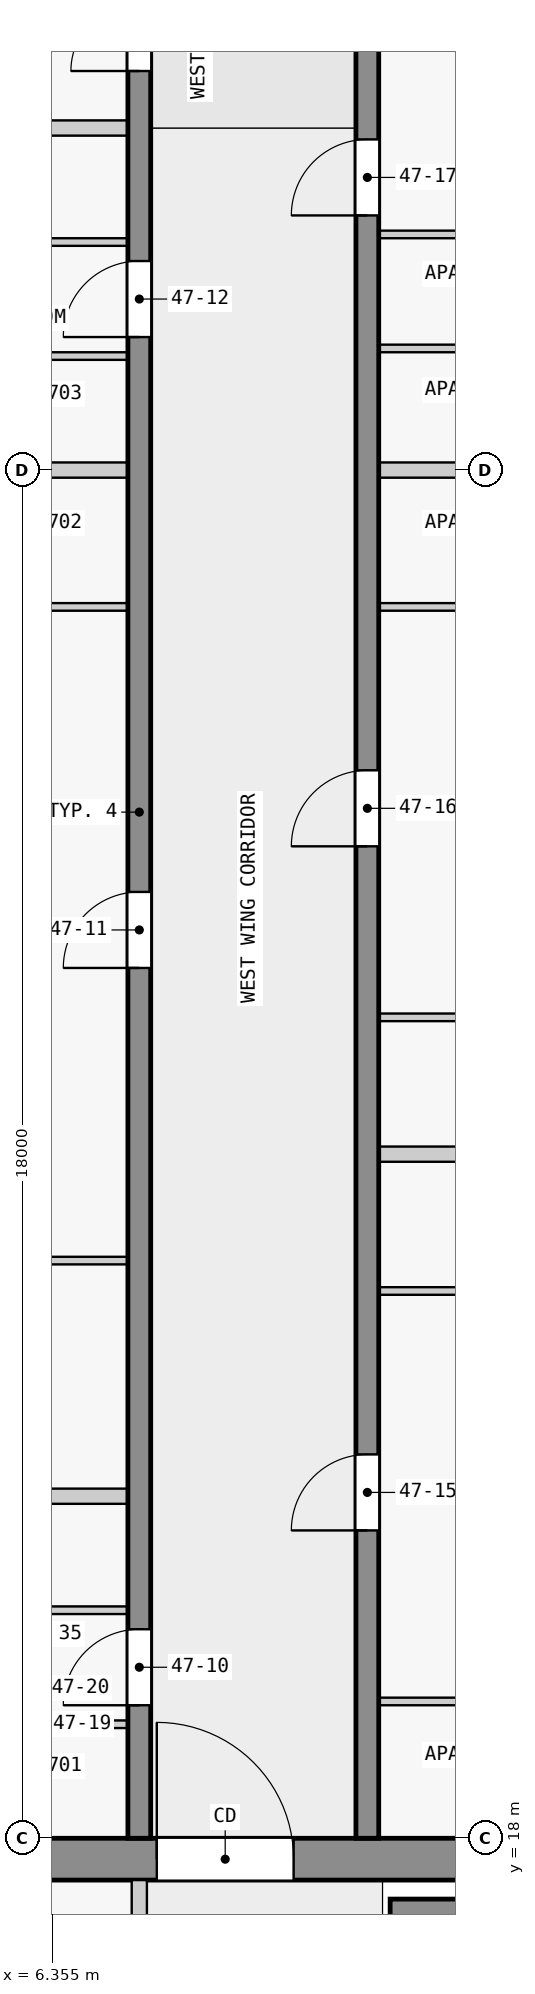
"""IFC4 building model, lengths in metres.
Left out: names, types, materials, properties, quantities, classifications, styles, units other than length and angle.
Written with IfcOpenShell. Run it as: python <this file> out.ifc"""

import sys

from ifc_helpers import new_model, si_unit, direction, frame, frame_2d, origin, place, context, subcontext, project, spatial, rectangle, extrude, element, fill, save


model = new_model("IFC4")
c1 = context("Model", 3, precision=1e-05, world=origin(), true_north=direction((0.0, 1.0)))
c2 = subcontext(c1, "Body", "Model", "MODEL_VIEW")
j1 = project(units=[si_unit("LENGTHUNIT", "METRE"), si_unit("PLANEANGLEUNIT", "RADIAN")], contexts=[c1])
p1 = place(None, origin())
s1 = spatial("IfcSite", under=j1, at=p1, CompositionType="ELEMENT")
p2 = place(p1, origin())
s2 = spatial("IfcBuilding", under=s1, at=p2, CompositionType="ELEMENT")
p3 = place(p2, frame((0.0, 0.0, 181.4)))
s3 = spatial("IfcBuildingStorey", under=s2, at=p3, CompositionType="ELEMENT", Elevation=181.4)
p4 = place(p3, frame((1.38, 17.725, 0.0), z_axis=(0.0, 0.0, 1.0), x_axis=(1.0, 0.0, 0.0)))
e1 = element("IfcWall", 1, at=p4, inside=s3, PredefinedType="SHEAR", context=c2, shape_type="SweptSolid", body=[
    extrude(rectangle(XDim=21.12, YDim=0.55, at=frame_2d((10.56, 0.0))), origin(), (0.0, 0.0, 1.0), 3.2),
])
p5 = place(p4, frame((6.35, 0.0, 0.0)))
e2 = element("IfcOpeningElement", 2, at=p5, cuts=e1, PredefinedType="OPENING", context=c2, shape_type="SweptSolid", body=[
    extrude(rectangle(XDim=1.8, YDim=2.1, at=frame_2d((0.9, 1.05))), frame((0.0, 0.285, 0.0), z_axis=(0.0, -1.0, 0.0), x_axis=(1.0, 0.0, 0.0)), (0.0, 0.0, 1.0), 0.57),
])
p6 = place(p3, frame((10.8, 17.05, 0.0), z_axis=(0.0, 0.0, 1.0), x_axis=(1.0, 0.0, 0.0)))
e3 = element("IfcWall", 3, at=p6, inside=s3, PredefinedType="SHEAR", context=c2, shape_type="SweptSolid", body=[
    extrude(rectangle(XDim=7.8, YDim=0.3, at=frame_2d((3.9, 0.0))), origin(), (0.0, 0.0, 1.0), 3.2),
])
p7 = place(p3, frame((7.5, 18.0, 0.0), z_axis=(0.0, 0.0, 1.0), x_axis=(0.0, 1.0, 0.0)))
e4 = element("IfcWall", 4, at=p7, inside=s3, PredefinedType="SHEAR", context=c2, shape_type="SweptSolid", body=[
    extrude(rectangle(XDim=27.0, YDim=0.3, at=frame_2d((13.5, 0.0))), origin(), (0.0, 0.0, 1.0), 3.2),
])
p8 = place(p7, frame((1.75, 0.0, 0.0)))
e5 = element("IfcOpeningElement", 5, at=p8, cuts=e4, PredefinedType="OPENING", context=c2, shape_type="SweptSolid", body=[
    extrude(rectangle(XDim=1.0, YDim=2.1, at=frame_2d((0.5, 1.05))), frame((0.0, 0.16, 0.0), z_axis=(0.0, -1.0, 0.0), x_axis=(1.0, 0.0, 0.0)), (0.0, 0.0, 1.0), 0.32),
])
p9 = place(p7, frame((11.45, 0.0, 0.0)))
e6 = element("IfcOpeningElement", 6, at=p9, cuts=e4, PredefinedType="OPENING", context=c2, shape_type="SweptSolid", body=[
    extrude(rectangle(XDim=1.0, YDim=2.1, at=frame_2d((0.5, 1.05))), frame((0.0, 0.16, 0.0), z_axis=(0.0, -1.0, 0.0), x_axis=(1.0, 0.0, 0.0)), (0.0, 0.0, 1.0), 0.32),
])
p10 = place(p7, frame((19.75, 0.0, 0.0)))
e7 = element("IfcOpeningElement", 7, at=p10, cuts=e4, PredefinedType="OPENING", context=c2, shape_type="SweptSolid", body=[
    extrude(rectangle(XDim=1.0, YDim=2.1, at=frame_2d((0.5, 1.05))), frame((0.0, 0.16, 0.0), z_axis=(0.0, -1.0, 0.0), x_axis=(1.0, 0.0, 0.0)), (0.0, 0.0, 1.0), 0.32),
])
p11 = place(p7, frame((23.25, 0.0, 0.0)))
e8 = element("IfcOpeningElement", 8, at=p11, cuts=e4, PredefinedType="OPENING", context=c2, shape_type="SweptSolid", body=[
    extrude(rectangle(XDim=0.9, YDim=2.1, at=frame_2d((0.45, 1.05))), frame((0.0, 0.16, 0.0), z_axis=(0.0, -1.0, 0.0), x_axis=(1.0, 0.0, 0.0)), (0.0, 0.0, 1.0), 0.32),
])
p12 = place(p7, frame((25.45, 0.0, 0.0)))
e9 = element("IfcOpeningElement", 9, at=p12, cuts=e4, PredefinedType="OPENING", context=c2, shape_type="SweptSolid", body=[
    extrude(rectangle(XDim=1.0, YDim=2.1, at=frame_2d((0.5, 1.05))), frame((0.0, 0.16, 0.0), z_axis=(0.0, -1.0, 0.0), x_axis=(1.0, 0.0, 0.0)), (0.0, 0.0, 1.0), 0.32),
])
p13 = place(p3, frame((10.5, 18.0, 0.0), z_axis=(0.0, 0.0, 1.0), x_axis=(0.0, 1.0, 0.0)))
e10 = element("IfcWall", 10, at=p13, inside=s3, PredefinedType="SHEAR", context=c2, shape_type="SweptSolid", body=[
    extrude(rectangle(XDim=27.0, YDim=0.3, at=frame_2d((13.5, 0.0))), origin(), (0.0, 0.0, 1.0), 3.2),
])
p14 = place(p13, frame((4.05, 0.0, 0.0)))
e11 = element("IfcOpeningElement", 11, at=p14, cuts=e10, PredefinedType="OPENING", context=c2, shape_type="SweptSolid", body=[
    extrude(rectangle(XDim=1.0, YDim=2.1, at=frame_2d((0.5, 1.05))), frame((0.0, 0.16, 0.0), z_axis=(0.0, -1.0, 0.0), x_axis=(1.0, 0.0, 0.0)), (0.0, 0.0, 1.0), 0.32),
])
p15 = place(p13, frame((13.05, 0.0, 0.0)))
e12 = element("IfcOpeningElement", 12, at=p15, cuts=e10, PredefinedType="OPENING", context=c2, shape_type="SweptSolid", body=[
    extrude(rectangle(XDim=1.0, YDim=2.1, at=frame_2d((0.5, 1.05))), frame((0.0, 0.16, 0.0), z_axis=(0.0, -1.0, 0.0), x_axis=(1.0, 0.0, 0.0)), (0.0, 0.0, 1.0), 0.32),
])
p16 = place(p13, frame((21.35, 0.0, 0.0)))
e13 = element("IfcOpeningElement", 13, at=p16, cuts=e10, PredefinedType="OPENING", context=c2, shape_type="SweptSolid", body=[
    extrude(rectangle(XDim=1.0, YDim=2.1, at=frame_2d((0.5, 1.05))), frame((0.0, 0.16, 0.0), z_axis=(0.0, -1.0, 0.0), x_axis=(1.0, 0.0, 0.0)), (0.0, 0.0, 1.0), 0.32),
])
p17 = place(p3, frame((7.5, 10.1, 0.0), z_axis=(0.0, 0.0, 1.0), x_axis=(0.0, 1.0, 0.0)))
e14 = element("IfcWall", 14, at=p17, inside=s3, PredefinedType="PARTITIONING", context=c2, shape_type="SweptSolid", body=[
    extrude(rectangle(XDim=7.35, YDim=0.2, at=frame_2d((3.675, 0.0))), origin(), (0.0, 0.0, 1.0), 3.2),
])
p18 = place(p17, frame((1.5, 0.0, 0.0)))
e15 = element("IfcOpeningElement", 15, at=p18, cuts=e14, PredefinedType="OPENING", context=c2, shape_type="SweptSolid", body=[
    extrude(rectangle(XDim=0.9, YDim=2.1, at=frame_2d((0.45, 1.05))), frame((0.0, 0.11, 0.0), z_axis=(0.0, -1.0, 0.0), x_axis=(1.0, 0.0, 0.0)), (0.0, 0.0, 1.0), 0.22),
])
p19 = place(p17, frame((5.175, 0.0, 0.0)))
e16 = element("IfcOpeningElement", 16, at=p19, cuts=e14, PredefinedType="OPENING", context=c2, shape_type="SweptSolid", body=[
    extrude(rectangle(XDim=0.9, YDim=2.1, at=frame_2d((0.45, 1.05))), frame((0.0, 0.11, 0.0), z_axis=(0.0, -1.0, 0.0), x_axis=(1.0, 0.0, 0.0)), (0.0, 0.0, 1.0), 0.22),
])
p20 = place(p3, frame((7.35, 19.5, 0.0), z_axis=(0.0, 0.0, 1.0), x_axis=(-1.0, 0.0, 0.0)))
e17 = element("IfcWall", 17, at=p20, inside=s3, PredefinedType="PARTITIONING", context=c2, shape_type="SweptSolid", body=[
    extrude(rectangle(XDim=3.4, YDim=0.1, at=frame_2d((1.7, 0.0))), origin(), (0.0, 0.0, 1.0), 3.2),
])
p21 = place(p20, frame((1.25, 0.0, 0.0)))
e18 = element("IfcOpeningElement", 18, at=p21, cuts=e17, PredefinedType="OPENING", context=c2, shape_type="SweptSolid", body=[
    extrude(rectangle(XDim=0.9, YDim=2.1, at=frame_2d((0.45, 1.05))), frame((0.0, 0.06, 0.0), z_axis=(0.0, -1.0, 0.0), x_axis=(1.0, 0.0, 0.0)), (0.0, 0.0, 1.0), 0.12),
])
p22 = place(p3, frame((14.05, 19.8, 0.0), z_axis=(0.0, 0.0, 1.0), x_axis=(-1.0, 0.0, 0.0)))
e19 = element("IfcWall", 19, at=p22, inside=s3, PredefinedType="PARTITIONING", context=c2, shape_type="SweptSolid", body=[
    extrude(rectangle(XDim=3.4, YDim=0.1, at=frame_2d((1.7, 0.0))), origin(), (0.0, 0.0, 1.0), 3.2),
])
p23 = place(p22, frame((1.25, 0.0, 0.0)))
e20 = element("IfcOpeningElement", 20, at=p23, cuts=e19, PredefinedType="OPENING", context=c2, shape_type="SweptSolid", body=[
    extrude(rectangle(XDim=0.9, YDim=2.1, at=frame_2d((0.45, 1.05))), frame((0.0, 0.06, 0.0), z_axis=(0.0, -1.0, 0.0), x_axis=(1.0, 0.0, 0.0)), (0.0, 0.0, 1.0), 0.12),
])
p24 = place(p3, frame((4.0, 21.0, 0.0), z_axis=(0.0, 0.0, 1.0), x_axis=(1.0, 0.0, 0.0)))
e21 = element("IfcWall", 21, at=p24, inside=s3, PredefinedType="PARTITIONING", context=c2, shape_type="SweptSolid", body=[
    extrude(rectangle(XDim=3.35, YDim=0.1, at=frame_2d((1.675, 0.0))), origin(), (0.0, 0.0, 1.0), 3.2),
])
p25 = place(p24, frame((1.25, 0.0, 0.0)))
e22 = element("IfcOpeningElement", 22, at=p25, cuts=e21, PredefinedType="OPENING", context=c2, shape_type="SweptSolid", body=[
    extrude(rectangle(XDim=0.9, YDim=2.1, at=frame_2d((0.45, 1.05))), frame((0.0, 0.06, 0.0), z_axis=(0.0, -1.0, 0.0), x_axis=(1.0, 0.0, 0.0)), (0.0, 0.0, 1.0), 0.12),
])
p26 = place(p3, frame((7.35, 22.5, 0.0), z_axis=(0.0, 0.0, 1.0), x_axis=(-1.0, 0.0, 0.0)))
e23 = element("IfcWall", 23, at=p26, inside=s3, PredefinedType="PARTITIONING", context=c2, shape_type="SweptSolid", body=[
    extrude(rectangle(XDim=3.3, YDim=0.2, at=frame_2d((1.65, 0.0))), origin(), (0.0, 0.0, 1.0), 3.2),
])
p27 = place(p3, frame((10.65, 25.2, 0.0), z_axis=(0.0, 0.0, 1.0), x_axis=(1.0, 0.0, 0.0)))
e24 = element("IfcWall", 24, at=p27, inside=s3, PredefinedType="PARTITIONING", context=c2, shape_type="SweptSolid", body=[
    extrude(rectangle(XDim=3.35, YDim=0.1, at=frame_2d((1.675, 0.0))), origin(), (0.0, 0.0, 1.0), 3.2),
])
p28 = place(p27, frame((1.25, 0.0, 0.0)))
e25 = element("IfcOpeningElement", 25, at=p28, cuts=e24, PredefinedType="OPENING", context=c2, shape_type="SweptSolid", body=[
    extrude(rectangle(XDim=0.9, YDim=2.1, at=frame_2d((0.45, 1.05))), frame((0.0, 0.06, 0.0), z_axis=(0.0, -1.0, 0.0), x_axis=(1.0, 0.0, 0.0)), (0.0, 0.0, 1.0), 0.12),
])
p29 = place(p3, frame((7.35, 25.6, 0.0), z_axis=(0.0, 0.0, 1.0), x_axis=(-1.0, 0.0, 0.0)))
e26 = element("IfcWall", 26, at=p29, inside=s3, PredefinedType="PARTITIONING", context=c2, shape_type="SweptSolid", body=[
    extrude(rectangle(XDim=3.35, YDim=0.1, at=frame_2d((1.675, 0.0))), origin(), (0.0, 0.0, 1.0), 3.2),
])
p30 = place(p29, frame((1.25, 0.0, 0.0)))
e27 = element("IfcOpeningElement", 27, at=p30, cuts=e26, PredefinedType="OPENING", context=c2, shape_type="SweptSolid", body=[
    extrude(rectangle(XDim=0.9, YDim=2.1, at=frame_2d((0.45, 1.05))), frame((0.0, 0.06, 0.0), z_axis=(0.0, -1.0, 0.0), x_axis=(1.0, 0.0, 0.0)), (0.0, 0.0, 1.0), 0.12),
])
p31 = place(p3, frame((13.95, 27.0, 0.0), z_axis=(0.0, 0.0, 1.0), x_axis=(-1.0, 0.0, 0.0)))
e28 = element("IfcWall", 28, at=p31, inside=s3, PredefinedType="PARTITIONING", context=c2, shape_type="SweptSolid", body=[
    extrude(rectangle(XDim=3.3, YDim=0.2, at=frame_2d((1.65, 0.0))), origin(), (0.0, 0.0, 1.0), 3.2),
])
p32 = place(p3, frame((14.0, 28.8, 0.0), z_axis=(0.0, 0.0, 1.0), x_axis=(-1.0, 0.0, 0.0)))
e29 = element("IfcWall", 29, at=p32, inside=s3, PredefinedType="PARTITIONING", context=c2, shape_type="SweptSolid", body=[
    extrude(rectangle(XDim=3.35, YDim=0.1, at=frame_2d((1.675, 0.0))), origin(), (0.0, 0.0, 1.0), 3.2),
])
p33 = place(p32, frame((1.25, 0.0, 0.0)))
e30 = element("IfcOpeningElement", 30, at=p33, cuts=e29, PredefinedType="OPENING", context=c2, shape_type="SweptSolid", body=[
    extrude(rectangle(XDim=0.9, YDim=2.1, at=frame_2d((0.45, 1.05))), frame((0.0, 0.06, 0.0), z_axis=(0.0, -1.0, 0.0), x_axis=(1.0, 0.0, 0.0)), (0.0, 0.0, 1.0), 0.12),
])
p34 = place(p3, frame((3.95, 34.2, 0.0), z_axis=(0.0, 0.0, 1.0), x_axis=(1.0, 0.0, 0.0)))
e31 = element("IfcWall", 31, at=p34, inside=s3, PredefinedType="PARTITIONING", context=c2, shape_type="SweptSolid", body=[
    extrude(rectangle(XDim=3.4, YDim=0.1, at=frame_2d((1.7, 0.0))), origin(), (0.0, 0.0, 1.0), 3.2),
])
p35 = place(p34, frame((1.25, 0.0, 0.0)))
e32 = element("IfcOpeningElement", 32, at=p35, cuts=e31, PredefinedType="OPENING", context=c2, shape_type="SweptSolid", body=[
    extrude(rectangle(XDim=0.9, YDim=2.1, at=frame_2d((0.45, 1.05))), frame((0.0, 0.06, 0.0), z_axis=(0.0, -1.0, 0.0), x_axis=(1.0, 0.0, 0.0)), (0.0, 0.0, 1.0), 0.12),
])
p36 = place(p3, frame((10.65, 34.2, 0.0), z_axis=(0.0, 0.0, 1.0), x_axis=(1.0, 0.0, 0.0)))
e33 = element("IfcWall", 33, at=p36, inside=s3, PredefinedType="PARTITIONING", context=c2, shape_type="SweptSolid", body=[
    extrude(rectangle(XDim=3.35, YDim=0.1, at=frame_2d((1.675, 0.0))), origin(), (0.0, 0.0, 1.0), 3.2),
])
p37 = place(p36, frame((1.25, 0.0, 0.0)))
e34 = element("IfcOpeningElement", 34, at=p37, cuts=e33, PredefinedType="OPENING", context=c2, shape_type="SweptSolid", body=[
    extrude(rectangle(XDim=0.9, YDim=2.1, at=frame_2d((0.45, 1.05))), frame((0.0, 0.06, 0.0), z_axis=(0.0, -1.0, 0.0), x_axis=(1.0, 0.0, 0.0)), (0.0, 0.0, 1.0), 0.12),
])
for number, where, z_axis, x_axis in (
    (35, (7.35, 36.0, 0.0), (0.0, 0.0, 1.0), (-1.0, 0.0, 0.0)),
    (36, (16.6, 36.0, 0.0), (0.0, 0.0, 1.0), (-1.0, 0.0, 0.0)),
):
    element("IfcWall", number, at=place(p3, frame(where, z_axis=z_axis, x_axis=x_axis)), inside=s3, PredefinedType="PARTITIONING", context=c2, shape_type="SweptSolid", body=[
        extrude(rectangle(XDim=5.95, YDim=0.2, at=frame_2d((2.975, 0.0))), origin(), (0.0, 0.0, 1.0), 3.2),
    ])
p38 = place(p3, frame((7.35, 37.5, 0.0), z_axis=(0.0, 0.0, 1.0), x_axis=(-1.0, 0.0, 0.0)))
e37 = element("IfcWall", 37, at=p38, inside=s3, PredefinedType="PARTITIONING", context=c2, shape_type="SweptSolid", body=[
    extrude(rectangle(XDim=3.4, YDim=0.1, at=frame_2d((1.7, 0.0))), origin(), (0.0, 0.0, 1.0), 3.2),
])
p39 = place(p38, frame((1.25, 0.0, 0.0)))
e38 = element("IfcOpeningElement", 38, at=p39, cuts=e37, PredefinedType="OPENING", context=c2, shape_type="SweptSolid", body=[
    extrude(rectangle(XDim=0.9, YDim=2.1, at=frame_2d((0.45, 1.05))), frame((0.0, 0.06, 0.0), z_axis=(0.0, -1.0, 0.0), x_axis=(1.0, 0.0, 0.0)), (0.0, 0.0, 1.0), 0.12),
])
p40 = place(p3, frame((14.0, 37.6, 0.0), z_axis=(0.0, 0.0, 1.0), x_axis=(-1.0, 0.0, 0.0)))
e39 = element("IfcWall", 39, at=p40, inside=s3, PredefinedType="PARTITIONING", context=c2, shape_type="SweptSolid", body=[
    extrude(rectangle(XDim=3.35, YDim=0.1, at=frame_2d((1.675, 0.0))), origin(), (0.0, 0.0, 1.0), 3.2),
])
p41 = place(p3, frame((3.95, 39.0, 0.0), z_axis=(0.0, 0.0, 1.0), x_axis=(1.0, 0.0, 0.0)))
e40 = element("IfcWall", 40, at=p41, inside=s3, PredefinedType="PARTITIONING", context=c2, shape_type="SweptSolid", body=[
    extrude(rectangle(XDim=3.4, YDim=0.1, at=frame_2d((1.7, 0.0))), origin(), (0.0, 0.0, 1.0), 3.2),
])
p42 = place(p41, frame((1.25, 0.0, 0.0)))
e41 = element("IfcOpeningElement", 41, at=p42, cuts=e40, PredefinedType="OPENING", context=c2, shape_type="SweptSolid", body=[
    extrude(rectangle(XDim=0.9, YDim=2.1, at=frame_2d((0.45, 1.05))), frame((0.0, 0.06, 0.0), z_axis=(0.0, -1.0, 0.0), x_axis=(1.0, 0.0, 0.0)), (0.0, 0.0, 1.0), 0.12),
])
p43 = place(p3, frame((14.0, 39.1, 0.0), z_axis=(0.0, 0.0, 1.0), x_axis=(-1.0, 0.0, 0.0)))
e42 = element("IfcWall", 42, at=p43, inside=s3, PredefinedType="PARTITIONING", context=c2, shape_type="SweptSolid", body=[
    extrude(rectangle(XDim=3.35, YDim=0.1, at=frame_2d((1.675, 0.0))), origin(), (0.0, 0.0, 1.0), 3.2),
])
p44 = place(p43, frame((1.25, 0.0, 0.0)))
e43 = element("IfcOpeningElement", 43, at=p44, cuts=e42, PredefinedType="OPENING", context=c2, shape_type="SweptSolid", body=[
    extrude(rectangle(XDim=0.9, YDim=2.1, at=frame_2d((0.45, 1.05))), frame((0.0, 0.06, 0.0), z_axis=(0.0, -1.0, 0.0), x_axis=(1.0, 0.0, 0.0)), (0.0, 0.0, 1.0), 0.12),
])
p45 = place(p3, frame((7.35, 40.5, 0.0), z_axis=(0.0, 0.0, 1.0), x_axis=(-1.0, 0.0, 0.0)))
e44 = element("IfcWall", 44, at=p45, inside=s3, PredefinedType="PARTITIONING", context=c2, shape_type="SweptSolid", body=[
    extrude(rectangle(XDim=3.3, YDim=0.2, at=frame_2d((1.65, 0.0))), origin(), (0.0, 0.0, 1.0), 3.2),
])
p46 = place(p5, origin())
e45 = element("IfcDoor", 45, at=p46, inside=s3, OperationType="DOUBLE_DOOR_SINGLE_SWING", PredefinedType="DOOR", context=c2, shape_type="SweptSolid", body=[
    extrude(rectangle(XDim=1.8, YDim=2.1, at=frame_2d((0.9, 1.05))), frame((0.0, 0.025, 0.0), z_axis=(0.0, -1.0, 0.0), x_axis=(1.0, 0.0, 0.0)), (0.0, 0.0, 1.0), 0.05),
])
fill(e2, e45)
p47 = place(p8, origin())
e46 = element("IfcDoor", 46, at=p47, inside=s3, OperationType="SINGLE_SWING_LEFT", PredefinedType="DOOR", context=c2, shape_type="SweptSolid", body=[
    extrude(rectangle(XDim=1.0, YDim=2.1, at=frame_2d((0.5, 1.05))), frame((0.0, 0.025, 0.0), z_axis=(0.0, -1.0, 0.0), x_axis=(1.0, 0.0, 0.0)), (0.0, 0.0, 1.0), 0.05),
])
fill(e5, e46)
p48 = place(p9, origin())
e47 = element("IfcDoor", 47, at=p48, inside=s3, OperationType="SINGLE_SWING_LEFT", PredefinedType="DOOR", context=c2, shape_type="SweptSolid", body=[
    extrude(rectangle(XDim=1.0, YDim=2.1, at=frame_2d((0.5, 1.05))), frame((0.0, 0.025, 0.0), z_axis=(0.0, -1.0, 0.0), x_axis=(1.0, 0.0, 0.0)), (0.0, 0.0, 1.0), 0.05),
])
fill(e6, e47)
p49 = place(p10, origin())
e48 = element("IfcDoor", 48, at=p49, inside=s3, OperationType="SINGLE_SWING_RIGHT", PredefinedType="DOOR", context=c2, shape_type="SweptSolid", body=[
    extrude(rectangle(XDim=1.0, YDim=2.1, at=frame_2d((0.5, 1.05))), frame((0.0, 0.025, 0.0), z_axis=(0.0, -1.0, 0.0), x_axis=(1.0, 0.0, 0.0)), (0.0, 0.0, 1.0), 0.05),
])
fill(e7, e48)
p50 = place(p11, origin())
e49 = element("IfcDoor", 49, at=p50, inside=s3, OperationType="SINGLE_SWING_RIGHT", PredefinedType="DOOR", context=c2, shape_type="SweptSolid", body=[
    extrude(rectangle(XDim=0.9, YDim=2.1, at=frame_2d((0.45, 1.05))), frame((0.0, 0.025, 0.0), z_axis=(0.0, -1.0, 0.0), x_axis=(1.0, 0.0, 0.0)), (0.0, 0.0, 1.0), 0.05),
])
fill(e8, e49)
p51 = place(p14, origin())
e50 = element("IfcDoor", 50, at=p51, inside=s3, OperationType="SINGLE_SWING_LEFT", PredefinedType="DOOR", context=c2, shape_type="SweptSolid", body=[
    extrude(rectangle(XDim=1.0, YDim=2.1, at=frame_2d((0.5, 1.05))), frame((0.0, 0.025, 0.0), z_axis=(0.0, -1.0, 0.0), x_axis=(1.0, 0.0, 0.0)), (0.0, 0.0, 1.0), 0.05),
])
fill(e11, e50)
p52 = place(p15, origin())
e51 = element("IfcDoor", 51, at=p52, inside=s3, OperationType="SINGLE_SWING_RIGHT", PredefinedType="DOOR", context=c2, shape_type="SweptSolid", body=[
    extrude(rectangle(XDim=1.0, YDim=2.1, at=frame_2d((0.5, 1.05))), frame((0.0, 0.025, 0.0), z_axis=(0.0, -1.0, 0.0), x_axis=(1.0, 0.0, 0.0)), (0.0, 0.0, 1.0), 0.05),
])
fill(e12, e51)
p53 = place(p16, origin())
e52 = element("IfcDoor", 52, at=p53, inside=s3, OperationType="SINGLE_SWING_RIGHT", PredefinedType="DOOR", context=c2, shape_type="SweptSolid", body=[
    extrude(rectangle(XDim=1.0, YDim=2.1, at=frame_2d((0.5, 1.05))), frame((0.0, 0.025, 0.0), z_axis=(0.0, -1.0, 0.0), x_axis=(1.0, 0.0, 0.0)), (0.0, 0.0, 1.0), 0.05),
])
fill(e13, e52)
save(model, sys.argv[1])
